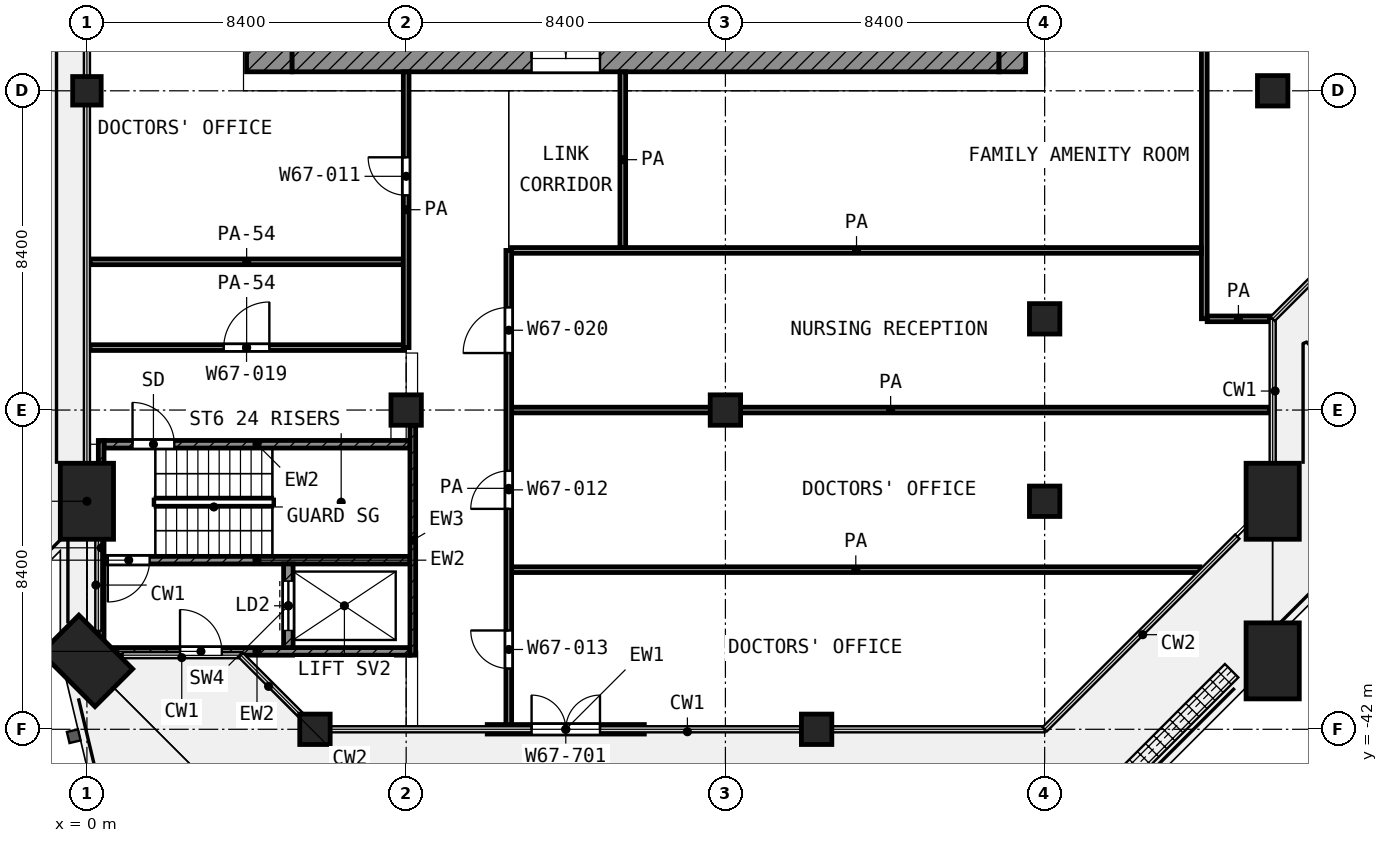
"""IFC4 building model, lengths in metres.
Left out: names, types, materials, properties, quantities, classifications, styles, units other than length and angle.
Written with IfcOpenShell. Run it as: python <this file> out.ifc"""

import sys

from ifc_helpers import new_model, si_unit, direction, frame, frame_2d, origin, origin_2d, place, context, subcontext, project, spatial, rectangle, extrude, element, fill, save


model = new_model("IFC4")
c1 = context("Model", 3, precision=1e-05, world=origin(), true_north=direction((0.0, 1.0)))
c2 = subcontext(c1, "Body", "Model", "MODEL_VIEW")
j1 = project(units=[si_unit("LENGTHUNIT", "METRE"), si_unit("PLANEANGLEUNIT", "RADIAN")], contexts=[c1])
p1 = place(None, origin())
s1 = spatial("IfcSite", under=j1, at=p1, CompositionType="ELEMENT")
p2 = place(p1, origin())
s2 = spatial("IfcBuilding", under=s1, at=p2, CompositionType="ELEMENT")
p3 = place(p2, frame((0.0, 0.0, 290.2)))
s3 = spatial("IfcBuildingStorey", under=s2, at=p3, CompositionType="ELEMENT", Elevation=290.2)
p4 = place(p3, frame((0.0, -25.2, 0.0), z_axis=(0.0, 0.0, 1.0), x_axis=(1.0, 0.0, 0.0)))
e1 = element("IfcColumn", 1, at=p4, inside=s3, PredefinedType="COLUMN", context=c2, shape_type="SweptSolid", body=[
    extrude(rectangle(XDim=0.75, YDim=0.75, at=origin_2d()), origin(), (0.0, 0.0, 1.0), 4.2),
])
for number, where, z_axis, x_axis in (
    (2, (31.2, -25.2, 0.0), (0.0, 0.0, 1.0), (1.0, 0.0, 0.0)),
    (3, (25.2, -31.2, 0.0), (0.0, 0.0, 1.0), (1.0, 0.0, 0.0)),
    (4, (8.4, -33.6, 0.0), (0.0, 0.0, 1.0), (1.0, 0.0, 0.0)),
    (5, (16.8, -33.6, 0.0), (0.0, 0.0, 1.0), (1.0, 0.0, 0.0)),
):
    element("IfcColumn", number, at=place(p3, frame(where, z_axis=z_axis, x_axis=x_axis)), inside=s3, PredefinedType="COLUMN", context=c2, shape_type="SweptSolid", body=[
        extrude(rectangle(XDim=0.8, YDim=0.8, at=origin_2d()), origin(), (0.0, 0.0, 1.0), 4.2),
    ])
p5 = place(p3, frame((0.0, -36.0, 0.0), z_axis=(0.0, 0.0, 1.0), x_axis=(0.0, 1.0, 0.0)))
e6 = element("IfcColumn", 6, at=p5, inside=s3, PredefinedType="COLUMN", context=c2, shape_type="SweptSolid", body=[
    extrude(rectangle(XDim=2.0, YDim=1.4, at=origin_2d()), origin(), (0.0, 0.0, 1.0), 4.2),
])
for number, where, z_axis, x_axis in (
    (7, (25.2, -36.0, 0.0), (0.0, 0.0, 1.0), (1.0, 0.0, 0.0)),
    (8, (6.0, -42.0, 0.0), (0.0, 0.0, 1.0), (1.0, 0.0, 0.0)),
    (9, (19.2, -42.0, 0.0), (0.0, 0.0, 1.0), (1.0, 0.0, 0.0)),
):
    element("IfcColumn", number, at=place(p3, frame(where, z_axis=z_axis, x_axis=x_axis)), inside=s3, PredefinedType="COLUMN", context=c2, shape_type="SweptSolid", body=[
        extrude(rectangle(XDim=0.8, YDim=0.8, at=origin_2d()), origin(), (0.0, 0.0, 1.0), 4.2),
    ])
for number, where, z_axis, x_axis in (
    (10, (31.2, -36.0, 0.0), (0.0, 0.0, 1.0), (0.0, -1.0, 0.0)),
    (11, (31.2, -40.2, 0.0), (0.0, 0.0, 1.0), (0.0, -1.0, 0.0)),
    (12, (0.0, -40.2, 0.0), (0.0, 0.0, 1.0), (-0.707, 0.707, 0.0)),
):
    element("IfcColumn", number, at=place(p3, frame(where, z_axis=z_axis, x_axis=x_axis)), inside=s3, PredefinedType="COLUMN", context=c2, shape_type="SweptSolid", body=[
        extrude(rectangle(XDim=2.0, YDim=1.4, at=origin_2d()), origin(), (0.0, 0.0, 1.0), 4.2),
    ])
p6 = place(p3, frame((10.533, -42.0, 0.0), z_axis=(0.0, 0.0, 1.0), x_axis=(1.0, 0.0, 0.0)))
e13 = element("IfcWall", 13, at=p6, inside=s3, PredefinedType="SOLIDWALL", context=c2, shape_type="SweptSolid", body=[
    extrude(rectangle(XDim=4.133, YDim=0.25, at=frame_2d((2.067, 0.0))), origin(), (0.0, 0.0, 1.0), 3.48),
])
p7 = place(p6, frame((1.167, 0.0, 0.0)))
e14 = element("IfcOpeningElement", 14, at=p7, cuts=e13, PredefinedType="OPENING", context=c2, shape_type="SweptSolid", body=[
    extrude(rectangle(XDim=1.8, YDim=2.1, at=frame_2d((0.9, 1.05))), frame((0.0, 0.135, 0.0), z_axis=(0.0, -1.0, 0.0), x_axis=(1.0, 0.0, 0.0)), (0.0, 0.0, 1.0), 0.27),
])
p8 = place(p3, frame((4.8, -24.7, 0.0), z_axis=(0.0, 0.0, 1.0), x_axis=(0.0, 1.0, 0.0)))
e15 = element("IfcWall", 15, at=p8, inside=s3, PredefinedType="SHEAR", context=c2, shape_type="SweptSolid", body=[
    extrude(rectangle(XDim=19.3, YDim=1.2, at=frame_2d((9.65, 0.0))), origin(), (0.0, 0.0, 1.0), 3.6),
])
p9 = place(p8, frame((11.15, 0.0, 0.0)))
e16 = element("IfcOpeningElement", 16, at=p9, cuts=e15, PredefinedType="OPENING", context=c2, shape_type="SweptSolid", body=[
    extrude(rectangle(XDim=1.1, YDim=2.1, at=frame_2d((0.55, 1.05))), frame((0.0, 0.61, 0.0), z_axis=(0.0, -1.0, 0.0), x_axis=(1.0, 0.0, 0.0)), (0.0, 0.0, 1.0), 1.22),
])
p10 = place(p8, frame((1.85, 0.0, 0.0)))
e17 = element("IfcOpeningElement", 17, at=p10, cuts=e15, PredefinedType="OPENING", context=c2, shape_type="SweptSolid", body=[
    extrude(rectangle(XDim=1.1, YDim=2.1, at=frame_2d((0.55, 1.05))), frame((0.0, 0.61, 0.0), z_axis=(0.0, -1.0, 0.0), x_axis=(1.0, 0.0, 0.0)), (0.0, 0.0, 1.0), 1.22),
])
p11 = place(p3, frame((5.4, -24.35, 0.0), z_axis=(0.0, 0.0, 1.0), x_axis=(1.0, 0.0, 0.0)))
e18 = element("IfcWall", 18, at=p11, inside=s3, PredefinedType="SHEAR", context=c2, shape_type="SweptSolid", body=[
    extrude(rectangle(XDim=18.6, YDim=0.7, at=frame_2d((9.3, 0.0))), origin(), (0.0, 0.0, 1.0), 3.6),
])
p12 = place(p11, frame((6.3, 0.0, 0.0)))
e19 = element("IfcOpeningElement", 19, at=p12, cuts=e18, PredefinedType="OPENING", context=c2, shape_type="SweptSolid", body=[
    extrude(rectangle(XDim=1.8, YDim=2.1, at=frame_2d((0.9, 1.05))), frame((0.0, 0.36, 0.0), z_axis=(0.0, -1.0, 0.0), x_axis=(1.0, 0.0, 0.0)), (0.0, 0.0, 1.0), 0.72),
])
p13 = place(p3, frame((24.35, -24.7, 0.0), z_axis=(0.0, 0.0, 1.0), x_axis=(0.0, 1.0, 0.0)))
e20 = element("IfcWall", 20, at=p13, inside=s3, PredefinedType="SHEAR", context=c2, shape_type="SweptSolid", body=[
    extrude(rectangle(XDim=0.7, YDim=0.7, at=frame_2d((0.35, 0.0))), origin(), (0.0, 0.0, 1.0), 3.6),
])
p14 = place(p3, frame((0.375, -40.05, 0.0), z_axis=(0.0, 0.0, 1.0), x_axis=(0.0, 1.0, 0.0)))
e21 = element("IfcWall", 21, at=p14, inside=s3, PredefinedType="SHEAR", context=c2, shape_type="SweptSolid", body=[
    extrude(rectangle(XDim=5.65, YDim=0.15, at=frame_2d((2.825, 0.0))), origin(), (0.0, 0.0, 1.0), 3.6),
])
p15 = place(p3, frame((8.575, -40.05, 0.0), z_axis=(0.0, 0.0, 1.0), x_axis=(0.0, 1.0, 0.0)))
e22 = element("IfcWall", 22, at=p15, inside=s3, PredefinedType="SHEAR", context=c2, shape_type="SweptSolid", body=[
    extrude(rectangle(XDim=6.05, YDim=0.15, at=frame_2d((3.025, 0.0))), origin(), (0.0, 0.0, 1.0), 3.6),
])
p16 = place(p3, frame((0.45, -34.5, 0.0), z_axis=(0.0, 0.0, 1.0), x_axis=(1.0, 0.0, 0.0)))
e23 = element("IfcWall", 23, at=p16, inside=s3, PredefinedType="SHEAR", context=c2, shape_type="SweptSolid", body=[
    extrude(rectangle(XDim=8.05, YDim=0.2, at=frame_2d((4.025, 0.0))), origin(), (0.0, 0.0, 1.0), 3.6),
])
p17 = place(p16, frame((0.75, 0.0, 0.0)))
e24 = element("IfcOpeningElement", 24, at=p17, cuts=e23, PredefinedType="OPENING", context=c2, shape_type="SweptSolid", body=[
    extrude(rectangle(XDim=1.1, YDim=2.1, at=frame_2d((0.55, 1.05))), frame((0.0, 0.11, 0.0), z_axis=(0.0, -1.0, 0.0), x_axis=(1.0, 0.0, 0.0)), (0.0, 0.0, 1.0), 0.22),
])
p18 = place(p3, frame((0.45, -37.55, 0.0), z_axis=(0.0, 0.0, 1.0), x_axis=(1.0, 0.0, 0.0)))
e25 = element("IfcWall", 25, at=p18, inside=s3, PredefinedType="SHEAR", context=c2, shape_type="SweptSolid", body=[
    extrude(rectangle(XDim=8.05, YDim=0.2, at=frame_2d((4.025, 0.0))), origin(), (0.0, 0.0, 1.0), 3.6),
])
p19 = place(p18, frame((0.1, 0.0, 0.0)))
e26 = element("IfcOpeningElement", 26, at=p19, cuts=e25, PredefinedType="OPENING", context=c2, shape_type="SweptSolid", body=[
    extrude(rectangle(XDim=1.1, YDim=2.1, at=frame_2d((0.55, 1.05))), frame((0.0, 0.11, 0.0), z_axis=(0.0, -1.0, 0.0), x_axis=(1.0, 0.0, 0.0)), (0.0, 0.0, 1.0), 0.22),
])
p20 = place(p3, frame((0.45, -39.95, 0.0), z_axis=(0.0, 0.0, 1.0), x_axis=(1.0, 0.0, 0.0)))
e27 = element("IfcWall", 27, at=p20, inside=s3, PredefinedType="SHEAR", context=c2, shape_type="SweptSolid", body=[
    extrude(rectangle(XDim=8.05, YDim=0.2, at=frame_2d((4.025, 0.0))), origin(), (0.0, 0.0, 1.0), 3.6),
])
p21 = place(p20, frame((2.0, 0.0, 0.0)))
e28 = element("IfcOpeningElement", 28, at=p21, cuts=e27, PredefinedType="OPENING", context=c2, shape_type="SweptSolid", body=[
    extrude(rectangle(XDim=1.1, YDim=2.1, at=frame_2d((0.55, 1.05))), frame((0.0, 0.11, 0.0), z_axis=(0.0, -1.0, 0.0), x_axis=(1.0, 0.0, 0.0)), (0.0, 0.0, 1.0), 0.22),
])
p22 = place(p3, frame((5.3, -39.85, 0.0), z_axis=(0.0, 0.0, 1.0), x_axis=(0.0, 1.0, 0.0)))
e29 = element("IfcWall", 29, at=p22, inside=s3, PredefinedType="SHEAR", context=c2, shape_type="SweptSolid", body=[
    extrude(rectangle(XDim=2.2, YDim=0.25, at=frame_2d((1.1, 0.0))), origin(), (0.0, 0.0, 1.0), 3.6),
])
p23 = place(p22, frame((0.45, 0.0, 0.0)))
e30 = element("IfcOpeningElement", 30, at=p23, cuts=e29, PredefinedType="OPENING", context=c2, shape_type="SweptSolid", body=[
    extrude(rectangle(XDim=1.3, YDim=2.1, at=frame_2d((0.65, 1.05))), frame((0.0, 0.135, 0.0), z_axis=(0.0, -1.0, 0.0), x_axis=(1.0, 0.0, 0.0)), (0.0, 0.0, 1.0), 0.27),
])
p24 = place(p3, frame((11.175, -37.8, 0.0), z_axis=(0.0, 0.0, 1.0), x_axis=(1.0, 0.0, 0.0)))
e31 = element("IfcWall", 31, at=p24, inside=s3, PredefinedType="PARTITIONING", context=c2, shape_type="SweptSolid", body=[
    extrude(rectangle(XDim=18.112, YDim=0.15, at=frame_2d((9.056, 0.0))), origin(), (0.0, 0.0, 1.0), 3.6),
])
p25 = place(p3, frame((11.175, -33.6, 0.0), z_axis=(0.0, 0.0, 1.0), x_axis=(1.0, 0.0, 0.0)))
e32 = element("IfcWall", 32, at=p25, inside=s3, PredefinedType="PARTITIONING", context=c2, shape_type="SweptSolid", body=[
    extrude(rectangle(XDim=19.945, YDim=0.15, at=frame_2d((9.973, 0.0))), origin(), (0.0, 0.0, 1.0), 3.6),
])
p26 = place(p3, frame((0.08, -31.957, 0.0), z_axis=(0.0, 0.0, 1.0), x_axis=(1.0, 0.0, 0.0)))
e33 = element("IfcWall", 33, at=p26, inside=s3, PredefinedType="PARTITIONING", context=c2, shape_type="SweptSolid", body=[
    extrude(rectangle(XDim=8.245, YDim=0.15, at=frame_2d((4.123, 0.0))), origin(), (0.0, 0.0, 1.0), 2.7),
])
p27 = place(p26, frame((3.52, 0.0, 0.0)))
e34 = element("IfcOpeningElement", 34, at=p27, cuts=e33, PredefinedType="OPENING", context=c2, shape_type="SweptSolid", body=[
    extrude(rectangle(XDim=1.2, YDim=2.1, at=frame_2d((0.6, 1.05))), frame((0.0, 0.085, 0.0), z_axis=(0.0, -1.0, 0.0), x_axis=(1.0, 0.0, 0.0)), (0.0, 0.0, 1.0), 0.17),
])
p28 = place(p3, frame((29.477, -31.2, 0.0), z_axis=(0.0, 0.0, 1.0), x_axis=(1.0, 0.0, 0.0)))
e35 = element("IfcWall", 35, at=p28, inside=s3, PredefinedType="PARTITIONING", context=c2, shape_type="SweptSolid", body=[
    extrude(rectangle(XDim=1.643, YDim=0.15, at=frame_2d((0.822, 0.0))), origin(), (0.0, 0.0, 1.0), 3.6),
])
p29 = place(p3, frame((0.08, -29.7, 0.0), z_axis=(0.0, 0.0, 1.0), x_axis=(1.0, 0.0, 0.0)))
e36 = element("IfcWall", 36, at=p29, inside=s3, PredefinedType="PARTITIONING", context=c2, shape_type="SweptSolid", body=[
    extrude(rectangle(XDim=8.245, YDim=0.15, at=frame_2d((4.123, 0.0))), origin(), (0.0, 0.0, 1.0), 2.7),
])
p30 = place(p3, frame((11.175, -29.4, 0.0), z_axis=(0.0, 0.0, 1.0), x_axis=(1.0, 0.0, 0.0)))
e37 = element("IfcWall", 37, at=p30, inside=s3, PredefinedType="PARTITIONING", context=c2, shape_type="SweptSolid", body=[
    extrude(rectangle(XDim=18.15, YDim=0.15, at=frame_2d((9.075, 0.0))), origin(), (0.0, 0.0, 1.0), 3.6),
])
p31 = place(p3, frame((8.4, -31.957, 0.0), z_axis=(0.0, 0.0, 1.0), x_axis=(0.0, 1.0, 0.0)))
e38 = element("IfcWall", 38, at=p31, inside=s3, PredefinedType="PARTITIONING", context=c2, shape_type="SweptSolid", body=[
    extrude(rectangle(XDim=7.257, YDim=0.15, at=frame_2d((3.628, 0.0))), origin(), (0.0, 0.0, 1.0), 3.6),
])
p32 = place(p31, frame((4.007, 0.0, 0.0)))
e39 = element("IfcOpeningElement", 39, at=p32, cuts=e38, PredefinedType="OPENING", context=c2, shape_type="SweptSolid", body=[
    extrude(rectangle(XDim=1.0, YDim=2.1, at=frame_2d((0.5, 1.05))), frame((0.0, 0.085, 0.0), z_axis=(0.0, -1.0, 0.0), x_axis=(1.0, 0.0, 0.0)), (0.0, 0.0, 1.0), 0.17),
])
p33 = place(p3, frame((11.1, -41.92, 0.0), z_axis=(0.0, 0.0, 1.0), x_axis=(0.0, 1.0, 0.0)))
e40 = element("IfcWall", 40, at=p33, inside=s3, PredefinedType="PARTITIONING", context=c2, shape_type="SweptSolid", body=[
    extrude(rectangle(XDim=12.52, YDim=0.15, at=frame_2d((6.26, 0.0))), origin(), (0.0, 0.0, 1.0), 3.6),
])
p34 = place(p33, frame((9.82, 0.0, 0.0)))
e41 = element("IfcOpeningElement", 41, at=p34, cuts=e40, PredefinedType="OPENING", context=c2, shape_type="SweptSolid", body=[
    extrude(rectangle(XDim=1.2, YDim=2.1, at=frame_2d((0.6, 1.05))), frame((0.0, 0.085, 0.0), z_axis=(0.0, -1.0, 0.0), x_axis=(1.0, 0.0, 0.0)), (0.0, 0.0, 1.0), 0.17),
])
p35 = place(p33, frame((5.72, 0.0, 0.0)))
e42 = element("IfcOpeningElement", 42, at=p35, cuts=e40, PredefinedType="OPENING", context=c2, shape_type="SweptSolid", body=[
    extrude(rectangle(XDim=1.0, YDim=2.1, at=frame_2d((0.5, 1.05))), frame((0.0, 0.085, 0.0), z_axis=(0.0, -1.0, 0.0), x_axis=(1.0, 0.0, 0.0)), (0.0, 0.0, 1.0), 0.17),
])
p36 = place(p33, frame((1.52, 0.0, 0.0)))
e43 = element("IfcOpeningElement", 43, at=p36, cuts=e40, PredefinedType="OPENING", context=c2, shape_type="SweptSolid", body=[
    extrude(rectangle(XDim=1.0, YDim=2.1, at=frame_2d((0.5, 1.05))), frame((0.0, 0.085, 0.0), z_axis=(0.0, -1.0, 0.0), x_axis=(1.0, 0.0, 0.0)), (0.0, 0.0, 1.0), 0.17),
])
p37 = place(p3, frame((14.1, -29.325, 0.0), z_axis=(0.0, 0.0, 1.0), x_axis=(0.0, 1.0, 0.0)))
e44 = element("IfcWall", 44, at=p37, inside=s3, PredefinedType="PARTITIONING", context=c2, shape_type="SweptSolid", body=[
    extrude(rectangle(XDim=4.625, YDim=0.15, at=frame_2d((2.312, 0.0))), origin(), (0.0, 0.0, 1.0), 3.6),
])
p38 = place(p3, frame((29.4, -31.198, 0.0), z_axis=(0.0, 0.0, 1.0), x_axis=(0.0, 1.0, 0.0)))
e45 = element("IfcWall", 45, at=p38, inside=s3, PredefinedType="PARTITIONING", context=c2, shape_type="SweptSolid", body=[
    extrude(rectangle(XDim=20.098, YDim=0.15, at=frame_2d((10.049, 0.0))), origin(), (0.0, 0.0, 1.0), 3.6),
])
p39 = place(p7, origin())
e46 = element("IfcDoor", 46, at=p39, inside=s3, OperationType="DOUBLE_DOOR_SINGLE_SWING", PredefinedType="DOOR", context=c2, shape_type="SweptSolid", body=[
    extrude(rectangle(XDim=1.8, YDim=2.1, at=frame_2d((0.9, 1.05))), frame((0.0, 0.025, 0.0), z_axis=(0.0, -1.0, 0.0), x_axis=(1.0, 0.0, 0.0)), (0.0, 0.0, 1.0), 0.05),
])
fill(e14, e46)
p40 = place(p12, origin())
e47 = element("IfcDoor", 47, at=p40, inside=s3, OperationType="DOUBLE_DOOR_SINGLE_SWING", PredefinedType="DOOR", context=c2, shape_type="SweptSolid", body=[
    extrude(rectangle(XDim=1.8, YDim=2.1, at=frame_2d((0.9, 1.05))), frame((0.0, 0.025, 0.0), z_axis=(0.0, -1.0, 0.0), x_axis=(1.0, 0.0, 0.0)), (0.0, 0.0, 1.0), 0.05),
])
fill(e19, e47)
p41 = place(p17, origin())
e48 = element("IfcDoor", 48, at=p41, inside=s3, OperationType="SINGLE_SWING_LEFT", PredefinedType="DOOR", context=c2, shape_type="SweptSolid", body=[
    extrude(rectangle(XDim=1.1, YDim=2.1, at=frame_2d((0.55, 1.05))), frame((0.0, 0.025, 0.0), z_axis=(0.0, -1.0, 0.0), x_axis=(1.0, 0.0, 0.0)), (0.0, 0.0, 1.0), 0.05),
])
fill(e24, e48)
p42 = place(p19, frame((1.1, 0.0, 0.0), z_axis=(0.0, 0.0, 1.0), x_axis=(-1.0, 0.0, 0.0)))
e49 = element("IfcDoor", 49, at=p42, inside=s3, OperationType="SINGLE_SWING_LEFT", PredefinedType="DOOR", context=c2, shape_type="SweptSolid", body=[
    extrude(rectangle(XDim=1.1, YDim=2.1, at=frame_2d((0.55, 1.05))), frame((0.0, 0.025, 0.0), z_axis=(0.0, -1.0, 0.0), x_axis=(1.0, 0.0, 0.0)), (0.0, 0.0, 1.0), 0.05),
])
fill(e26, e49)
p43 = place(p23, origin())
e50 = element("IfcDoor", 50, at=p43, inside=s3, OperationType="DOUBLE_DOOR_SLIDING", PredefinedType="DOOR", context=c2, shape_type="SweptSolid", body=[
    extrude(rectangle(XDim=1.3, YDim=2.1, at=frame_2d((0.65, 1.05))), frame((0.0, 0.025, 0.0), z_axis=(0.0, -1.0, 0.0), x_axis=(1.0, 0.0, 0.0)), (0.0, 0.0, 1.0), 0.05),
])
fill(e30, e50)
p44 = place(p21, origin())
e51 = element("IfcDoor", 51, at=p44, inside=s3, OperationType="SINGLE_SWING_LEFT", PredefinedType="DOOR", context=c2, shape_type="SweptSolid", body=[
    extrude(rectangle(XDim=1.1, YDim=2.1, at=frame_2d((0.55, 1.05))), frame((0.0, 0.025, 0.0), z_axis=(0.0, -1.0, 0.0), x_axis=(1.0, 0.0, 0.0)), (0.0, 0.0, 1.0), 0.05),
])
fill(e28, e51)
p45 = place(p32, origin())
e52 = element("IfcDoor", 52, at=p45, inside=s3, OperationType="SINGLE_SWING_RIGHT", PredefinedType="DOOR", context=c2, shape_type="SweptSolid", body=[
    extrude(rectangle(XDim=1.0, YDim=2.1, at=frame_2d((0.5, 1.05))), frame((0.0, 0.025, 0.0), z_axis=(0.0, -1.0, 0.0), x_axis=(1.0, 0.0, 0.0)), (0.0, 0.0, 1.0), 0.05),
])
fill(e39, e52)
p46 = place(p27, origin())
e53 = element("IfcDoor", 53, at=p46, inside=s3, OperationType="SINGLE_SWING_RIGHT", PredefinedType="DOOR", context=c2, shape_type="SweptSolid", body=[
    extrude(rectangle(XDim=1.2, YDim=2.1, at=frame_2d((0.6, 1.05))), frame((0.0, 0.025, 0.0), z_axis=(0.0, -1.0, 0.0), x_axis=(1.0, 0.0, 0.0)), (0.0, 0.0, 1.0), 0.05),
])
fill(e34, e53)
p47 = place(p34, origin())
e54 = element("IfcDoor", 54, at=p47, inside=s3, OperationType="SINGLE_SWING_LEFT", PredefinedType="DOOR", context=c2, shape_type="SweptSolid", body=[
    extrude(rectangle(XDim=1.2, YDim=2.1, at=frame_2d((0.6, 1.05))), frame((0.0, 0.025, 0.0), z_axis=(0.0, -1.0, 0.0), x_axis=(1.0, 0.0, 0.0)), (0.0, 0.0, 1.0), 0.05),
])
fill(e41, e54)
p48 = place(p35, origin())
e55 = element("IfcDoor", 55, at=p48, inside=s3, OperationType="SINGLE_SWING_LEFT", PredefinedType="DOOR", context=c2, shape_type="SweptSolid", body=[
    extrude(rectangle(XDim=1.0, YDim=2.1, at=frame_2d((0.5, 1.05))), frame((0.0, 0.025, 0.0), z_axis=(0.0, -1.0, 0.0), x_axis=(1.0, 0.0, 0.0)), (0.0, 0.0, 1.0), 0.05),
])
fill(e42, e55)
p49 = place(p36, origin())
e56 = element("IfcDoor", 56, at=p49, inside=s3, OperationType="SINGLE_SWING_RIGHT", PredefinedType="DOOR", context=c2, shape_type="SweptSolid", body=[
    extrude(rectangle(XDim=1.0, YDim=2.1, at=frame_2d((0.5, 1.05))), frame((0.0, 0.025, 0.0), z_axis=(0.0, -1.0, 0.0), x_axis=(1.0, 0.0, 0.0)), (0.0, 0.0, 1.0), 0.05),
])
fill(e43, e56)
save(model, sys.argv[1])
